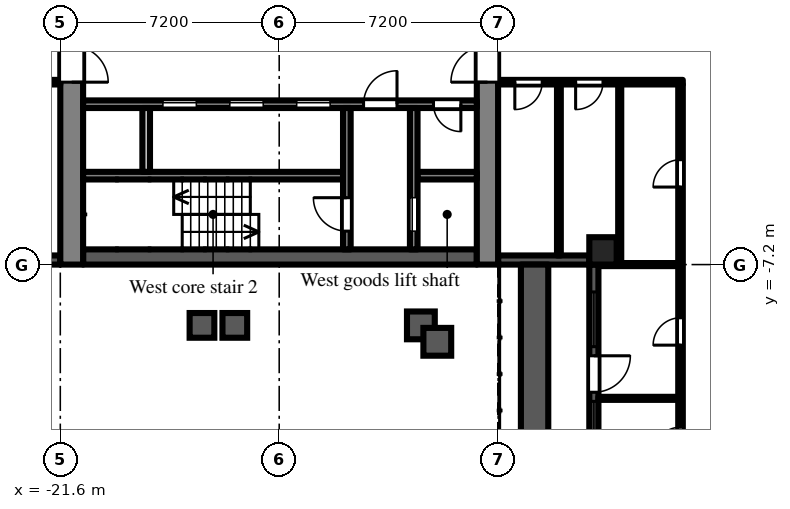
"""IFC4 building model, lengths in metres.
Left out: names, types, materials, properties, quantities, classifications, styles, units other than length and angle.
Written with IfcOpenShell. Run it as: python <this file> out.ifc"""

import sys

from ifc_helpers import new_model, si_unit, direction, frame, frame_2d, origin, origin_2d, place, context, subcontext, project, spatial, rectangle, extrude, element, fill, save


model = new_model("IFC4")
c1 = context("Model", 3, precision=1e-05, world=origin(), true_north=direction((0.0, 1.0)))
c2 = subcontext(c1, "Body", "Model", "MODEL_VIEW")
j1 = project(units=[si_unit("LENGTHUNIT", "METRE"), si_unit("PLANEANGLEUNIT", "RADIAN")], contexts=[c1])
p1 = place(None, origin())
s1 = spatial("IfcSite", under=j1, at=p1, CompositionType="ELEMENT")
p2 = place(p1, origin())
s2 = spatial("IfcBuilding", under=s1, at=p2, CompositionType="ELEMENT")
p3 = place(p2, frame((0.0, 0.0, 53.7)))
s3 = spatial("IfcBuildingStorey", under=s2, at=p3, CompositionType="ELEMENT", Elevation=53.7)
p4 = place(p3, frame((-3.75, -6.75, 0.0), z_axis=(0.0, 0.0, 1.0), x_axis=(1.0, 0.0, 0.0)))
e1 = element("IfcColumn", 1, at=p4, inside=s3, PredefinedType="COLUMN", context=c2, shape_type="SweptSolid", body=[
    extrude(rectangle(XDim=0.9, YDim=0.9, at=origin_2d()), origin(), (0.0, 0.0, 1.0), 3.0),
])
p5 = place(p3, frame((-24.3, -7.05, 0.0), z_axis=(0.0, 0.0, 1.0), x_axis=(1.0, 0.0, 0.0)))
e2 = element("IfcWall", 2, at=p5, inside=s3, PredefinedType="SOLIDWALL", context=c2, shape_type="SweptSolid", body=[
    extrude(rectangle(XDim=2.7, YDim=0.3, at=frame_2d((1.35, 0.0))), origin(), (0.0, 0.0, 1.0), 2.1),
])
p6 = place(p3, frame((-7.2, -7.05, 0.0), z_axis=(0.0, 0.0, 1.0), x_axis=(1.0, 0.0, 0.0)))
e3 = element("IfcWall", 3, at=p6, inside=s3, PredefinedType="SOLIDWALL", context=c2, shape_type="SweptSolid", body=[
    extrude(rectangle(XDim=3.0, YDim=0.3, at=frame_2d((1.5, 0.0))), origin(), (0.0, 0.0, 1.0), 2.1),
])
p7 = place(p3, frame((-4.05, -7.2, 0.0), z_axis=(0.0, 0.0, 1.0), x_axis=(0.0, -1.0, 0.0)))
e4 = element("IfcWall", 4, at=p7, inside=s3, PredefinedType="SOLIDWALL", context=c2, shape_type="SweptSolid", body=[
    extrude(rectangle(XDim=7.2, YDim=0.3, at=frame_2d((3.6, 0.0))), origin(), (0.0, 0.0, 1.0), 2.1),
])
p8 = place(p7, frame((3.0, 0.0, 0.0)))
e5 = element("IfcOpeningElement", 5, at=p8, cuts=e4, PredefinedType="OPENING", context=c2, shape_type="SweptSolid", body=[
    extrude(rectangle(XDim=1.2, YDim=2.05, at=frame_2d((0.6, 1.025))), frame((0.0, 0.16, 0.0), z_axis=(0.0, -1.0, 0.0), x_axis=(1.0, 0.0, 0.0)), (0.0, 0.0, 1.0), 0.32),
])
p9 = place(p7, frame((0.9, 0.0, 0.2)))
e6 = element("IfcOpeningElement", 6, at=p9, cuts=e4, PredefinedType="OPENING", context=c2, shape_type="SweptSolid", body=[
    extrude(rectangle(XDim=1.8, YDim=1.85, at=frame_2d((0.9, 0.925))), frame((0.0, 0.16, 0.0), z_axis=(0.0, -1.0, 0.0), x_axis=(1.0, 0.0, 0.0)), (0.0, 0.0, 1.0), 0.32),
])
p10 = place(p7, frame((4.5, 0.0, 0.2)))
e7 = element("IfcOpeningElement", 7, at=p10, cuts=e4, PredefinedType="OPENING", context=c2, shape_type="SweptSolid", body=[
    extrude(rectangle(XDim=1.8, YDim=1.85, at=frame_2d((0.9, 0.925))), frame((0.0, 0.16, 0.0), z_axis=(0.0, -1.0, 0.0), x_axis=(1.0, 0.0, 0.0)), (0.0, 0.0, 1.0), 0.32),
])
p11 = place(p3, frame((-6.0, -14.4, 0.0), z_axis=(0.0, 0.0, 1.0), x_axis=(0.0, 1.0, 0.0)))
e8 = element("IfcWall", 8, at=p11, inside=s3, PredefinedType="PARAPET", context=c2, shape_type="SweptSolid", body=[
    extrude(rectangle(XDim=7.2, YDim=0.9, at=frame_2d((3.6, 0.0))), origin(), (0.0, 0.0, 1.0), 0.8),
])
p12 = place(p3, frame((-7.55, -7.2, 0.0), z_axis=(0.0, 0.0, 1.0), x_axis=(0.0, 1.0, 0.0)))
e9 = element("IfcWall", 9, at=p12, inside=s3, PredefinedType="SHEAR", context=c2, shape_type="SweptSolid", body=[
    extrude(rectangle(XDim=14.4, YDim=0.7, at=frame_2d((7.2, 0.0))), origin(), (0.0, 0.0, 1.0), 2.575),
])
p13 = place(p12, frame((6.0, 0.0, 0.0)))
e10 = element("IfcOpeningElement", 10, at=p13, cuts=e9, PredefinedType="OPENING", context=c2, shape_type="SweptSolid", body=[
    extrude(rectangle(XDim=2.4, YDim=2.2, at=frame_2d((1.2, 1.1))), frame((0.0, 0.36, 0.0), z_axis=(0.0, -1.0, 0.0), x_axis=(1.0, 0.0, 0.0)), (0.0, 0.0, 1.0), 0.72),
])
p14 = place(p3, frame((-21.225, -7.2, 0.0), z_axis=(0.0, 0.0, 1.0), x_axis=(0.0, 1.0, 0.0)))
e11 = element("IfcWall", 11, at=p14, inside=s3, PredefinedType="SHEAR", context=c2, shape_type="SweptSolid", body=[
    extrude(rectangle(XDim=14.4, YDim=0.75, at=frame_2d((7.2, 0.0))), origin(), (0.0, 0.0, 1.0), 2.575),
])
p15 = place(p14, frame((6.0, 0.0, 0.0)))
e12 = element("IfcOpeningElement", 12, at=p15, cuts=e11, PredefinedType="OPENING", context=c2, shape_type="SweptSolid", body=[
    extrude(rectangle(XDim=2.4, YDim=2.2, at=frame_2d((1.2, 1.1))), frame((0.0, 0.385, 0.0), z_axis=(0.0, -1.0, 0.0), x_axis=(1.0, 0.0, 0.0)), (0.0, 0.0, 1.0), 0.77),
])
p16 = place(p3, frame((-7.9, -6.95, 0.0), z_axis=(0.0, 0.0, 1.0), x_axis=(-1.0, 0.0, 0.0)))
e13 = element("IfcWall", 13, at=p16, inside=s3, PredefinedType="SHEAR", context=c2, shape_type="SweptSolid", body=[
    extrude(rectangle(XDim=12.95, YDim=0.5, at=frame_2d((6.475, 0.0))), origin(), (0.0, 0.0, 1.0), 2.575),
])
p17 = place(p3, frame((-7.9, -1.925, 0.0), z_axis=(0.0, 0.0, 1.0), x_axis=(-1.0, 0.0, 0.0)))
e14 = element("IfcWall", 14, at=p17, inside=s3, PredefinedType="SHEAR", context=c2, shape_type="SweptSolid", body=[
    extrude(rectangle(XDim=12.95, YDim=0.25, at=frame_2d((6.475, 0.0))), origin(), (0.0, 0.0, 1.0), 2.575),
])
p18 = place(p17, frame((4.825, 0.0, 0.0)))
e15 = element("IfcOpeningElement", 15, at=p18, cuts=e14, PredefinedType="OPENING", context=c2, shape_type="SweptSolid", body=[
    extrude(rectangle(XDim=1.1, YDim=2.1, at=frame_2d((0.55, 1.05))), frame((0.0, 0.135, 0.0), z_axis=(0.0, -1.0, 0.0), x_axis=(1.0, 0.0, 0.0)), (0.0, 0.0, 1.0), 0.27),
])
p19 = place(p17, frame((7.025, 0.0, 0.0)))
e16 = element("IfcOpeningElement", 16, at=p19, cuts=e14, PredefinedType="OPENING", context=c2, shape_type="SweptSolid", body=[
    extrude(rectangle(XDim=1.1, YDim=2.1, at=frame_2d((0.55, 1.05))), frame((0.0, 0.135, 0.0), z_axis=(0.0, -1.0, 0.0), x_axis=(1.0, 0.0, 0.0)), (0.0, 0.0, 1.0), 0.27),
])
p20 = place(p17, frame((9.225, 0.0, 0.0)))
e17 = element("IfcOpeningElement", 17, at=p20, cuts=e14, PredefinedType="OPENING", context=c2, shape_type="SweptSolid", body=[
    extrude(rectangle(XDim=1.1, YDim=2.1, at=frame_2d((0.55, 1.05))), frame((0.0, 0.135, 0.0), z_axis=(0.0, -1.0, 0.0), x_axis=(1.0, 0.0, 0.0)), (0.0, 0.0, 1.0), 0.27),
])
p21 = place(p17, frame((0.525, 0.0, 0.0)))
e18 = element("IfcOpeningElement", 18, at=p21, cuts=e14, PredefinedType="OPENING", context=c2, shape_type="SweptSolid", body=[
    extrude(rectangle(XDim=0.9, YDim=2.1, at=frame_2d((0.45, 1.05))), frame((0.0, 0.135, 0.0), z_axis=(0.0, -1.0, 0.0), x_axis=(1.0, 0.0, 0.0)), (0.0, 0.0, 1.0), 0.27),
])
p22 = place(p17, frame((2.625, 0.0, 0.0)))
e19 = element("IfcOpeningElement", 19, at=p22, cuts=e14, PredefinedType="OPENING", context=c2, shape_type="SweptSolid", body=[
    extrude(rectangle(XDim=1.1, YDim=2.1, at=frame_2d((0.55, 1.05))), frame((0.0, 0.135, 0.0), z_axis=(0.0, -1.0, 0.0), x_axis=(1.0, 0.0, 0.0)), (0.0, 0.0, 1.0), 0.27),
])
p23 = place(p3, frame((-7.9, -4.275, 0.0), z_axis=(0.0, 0.0, 1.0), x_axis=(-1.0, 0.0, 0.0)))
e20 = element("IfcWall", 20, at=p23, inside=s3, PredefinedType="SHEAR", context=c2, shape_type="SweptSolid", body=[
    extrude(rectangle(XDim=1.95, YDim=0.25, at=frame_2d((0.975, 0.0))), origin(), (0.0, 0.0, 1.0), 2.575),
])
p24 = place(p3, frame((-12.3, -4.275, 0.0), z_axis=(0.0, 0.0, 1.0), x_axis=(-1.0, 0.0, 0.0)))
e21 = element("IfcWall", 21, at=p24, inside=s3, PredefinedType="SHEAR", context=c2, shape_type="SweptSolid", body=[
    extrude(rectangle(XDim=8.55, YDim=0.25, at=frame_2d((4.275, 0.0))), origin(), (0.0, 0.0, 1.0), 2.575),
])
p25 = place(p3, frame((-9.975, -2.05, 0.0), z_axis=(0.0, 0.0, 1.0), x_axis=(0.0, -1.0, 0.0)))
e22 = element("IfcWall", 22, at=p25, inside=s3, PredefinedType="SHEAR", context=c2, shape_type="SweptSolid", body=[
    extrude(rectangle(XDim=4.65, YDim=0.25, at=frame_2d((2.325, 0.0))), origin(), (0.0, 0.0, 1.0), 2.575),
])
p26 = place(p25, frame((2.95, 0.0, 0.0)))
e23 = element("IfcOpeningElement", 23, at=p26, cuts=e22, PredefinedType="OPENING", context=c2, shape_type="SweptSolid", body=[
    extrude(rectangle(XDim=1.1, YDim=2.1, at=frame_2d((0.55, 1.05))), frame((0.0, 0.135, 0.0), z_axis=(0.0, -1.0, 0.0), x_axis=(1.0, 0.0, 0.0)), (0.0, 0.0, 1.0), 0.27),
])
p27 = place(p3, frame((-12.175, -2.05, 0.0), z_axis=(0.0, 0.0, 1.0), x_axis=(0.0, -1.0, 0.0)))
e24 = element("IfcWall", 24, at=p27, inside=s3, PredefinedType="SHEAR", context=c2, shape_type="SweptSolid", body=[
    extrude(rectangle(XDim=4.65, YDim=0.25, at=frame_2d((2.325, 0.0))), origin(), (0.0, 0.0, 1.0), 2.575),
])
p28 = place(p27, frame((2.95, 0.0, 0.0)))
e25 = element("IfcOpeningElement", 25, at=p28, cuts=e24, PredefinedType="OPENING", context=c2, shape_type="SweptSolid", body=[
    extrude(rectangle(XDim=1.1, YDim=2.1, at=frame_2d((0.55, 1.05))), frame((0.0, 0.135, 0.0), z_axis=(0.0, -1.0, 0.0), x_axis=(1.0, 0.0, 0.0)), (0.0, 0.0, 1.0), 0.27),
])
p29 = place(p3, frame((-18.775, -2.05, 0.0), z_axis=(0.0, 0.0, 1.0), x_axis=(0.0, -1.0, 0.0)))
e26 = element("IfcWall", 26, at=p29, inside=s3, PredefinedType="PARTITIONING", context=c2, shape_type="SweptSolid", body=[
    extrude(rectangle(XDim=2.1, YDim=0.25, at=frame_2d((1.05, 0.0))), origin(), (0.0, 0.0, 1.0), 2.575),
])
p30 = place(p3, frame((-36.5, -1.2, 0.0), z_axis=(0.0, 0.0, 1.0), x_axis=(1.0, 0.0, 0.0)))
e27 = element("IfcWall", 27, at=p30, inside=s3, PredefinedType="PARTITIONING", context=c2, shape_type="SweptSolid", body=[
    extrude(rectangle(XDim=14.9, YDim=0.15, at=frame_2d((7.45, 0.0))), origin(), (0.0, 0.0, 1.0), 2.575),
])
p31 = place(p30, frame((10.4, 0.0, 0.0)))
e28 = element("IfcOpeningElement", 28, at=p31, cuts=e27, PredefinedType="OPENING", context=c2, shape_type="SweptSolid", body=[
    extrude(rectangle(XDim=1.8, YDim=2.1, at=frame_2d((0.9, 1.05))), frame((0.0, 0.085, 0.0), z_axis=(0.0, -1.0, 0.0), x_axis=(1.0, 0.0, 0.0)), (0.0, 0.0, 1.0), 0.17),
])
p32 = place(p30, frame((6.35, 0.0, 0.0)))
e29 = element("IfcOpeningElement", 29, at=p32, cuts=e27, PredefinedType="OPENING", context=c2, shape_type="SweptSolid", body=[
    extrude(rectangle(XDim=0.9, YDim=2.1, at=frame_2d((0.45, 1.05))), frame((0.0, 0.085, 0.0), z_axis=(0.0, -1.0, 0.0), x_axis=(1.0, 0.0, 0.0)), (0.0, 0.0, 1.0), 0.17),
])
p33 = place(p30, frame((4.55, 0.0, 0.0)))
e30 = element("IfcOpeningElement", 30, at=p33, cuts=e27, PredefinedType="OPENING", context=c2, shape_type="SweptSolid", body=[
    extrude(rectangle(XDim=0.9, YDim=2.1, at=frame_2d((0.45, 1.05))), frame((0.0, 0.085, 0.0), z_axis=(0.0, -1.0, 0.0), x_axis=(1.0, 0.0, 0.0)), (0.0, 0.0, 1.0), 0.17),
])
p34 = place(p30, frame((1.15, 0.0, 0.0)))
e31 = element("IfcOpeningElement", 31, at=p34, cuts=e27, PredefinedType="OPENING", context=c2, shape_type="SweptSolid", body=[
    extrude(rectangle(XDim=1.8, YDim=2.1, at=frame_2d((0.9, 1.05))), frame((0.0, 0.085, 0.0), z_axis=(0.0, -1.0, 0.0), x_axis=(1.0, 0.0, 0.0)), (0.0, 0.0, 1.0), 0.17),
])
p35 = place(p3, frame((-7.2, -1.2, 0.0), z_axis=(0.0, 0.0, 1.0), x_axis=(1.0, 0.0, 0.0)))
e32 = element("IfcWall", 32, at=p35, inside=s3, PredefinedType="PARTITIONING", context=c2, shape_type="SweptSolid", body=[
    extrude(rectangle(XDim=6.075, YDim=0.15, at=frame_2d((3.038, 0.0))), origin(), (0.0, 0.0, 1.0), 2.575),
])
p36 = place(p35, frame((2.55, 0.0, 0.0)))
e33 = element("IfcOpeningElement", 33, at=p36, cuts=e32, PredefinedType="OPENING", context=c2, shape_type="SweptSolid", body=[
    extrude(rectangle(XDim=0.9, YDim=2.1, at=frame_2d((0.45, 1.05))), frame((0.0, 0.085, 0.0), z_axis=(0.0, -1.0, 0.0), x_axis=(1.0, 0.0, 0.0)), (0.0, 0.0, 1.0), 0.17),
])
p37 = place(p35, frame((0.55, 0.0, 0.0)))
e34 = element("IfcOpeningElement", 34, at=p37, cuts=e32, PredefinedType="OPENING", context=c2, shape_type="SweptSolid", body=[
    extrude(rectangle(XDim=0.9, YDim=2.1, at=frame_2d((0.45, 1.05))), frame((0.0, 0.085, 0.0), z_axis=(0.0, -1.0, 0.0), x_axis=(1.0, 0.0, 0.0)), (0.0, 0.0, 1.0), 0.17),
])
p38 = place(p3, frame((-5.2, -6.9, 0.0), z_axis=(0.0, 0.0, 1.0), x_axis=(0.0, 1.0, 0.0)))
e35 = element("IfcWall", 35, at=p38, inside=s3, PredefinedType="PARTITIONING", context=c2, shape_type="SweptSolid", body=[
    extrude(rectangle(XDim=5.625, YDim=0.125, at=frame_2d((2.812, 0.0))), origin(), (0.0, 0.0, 1.0), 2.575),
])
for number, where, z_axis, x_axis in (
    (36, (-3.9, -11.6, 0.0), (0.0, 0.0, 1.0), (1.0, 0.0, 0.0)),
    (37, (-3.9, -7.2, 0.0), (0.0, 0.0, 1.0), (1.0, 0.0, 0.0)),
):
    element("IfcWall", number, at=place(p3, frame(where, z_axis=z_axis, x_axis=x_axis)), inside=s3, PredefinedType="PARTITIONING", context=c2, shape_type="SweptSolid", body=[
        extrude(rectangle(XDim=2.625, YDim=0.1, at=frame_2d((1.312, 0.0))), origin(), (0.0, 0.0, 1.0), 2.575),
    ])
p39 = place(p3, frame((-3.2, -7.15, 0.0), z_axis=(0.0, 0.0, 1.0), x_axis=(0.0, 1.0, 0.0)))
e38 = element("IfcWall", 38, at=p39, inside=s3, PredefinedType="PARTITIONING", context=c2, shape_type="SweptSolid", body=[
    extrude(rectangle(XDim=5.875, YDim=0.1, at=frame_2d((2.938, 0.0))), origin(), (0.0, 0.0, 1.0), 2.575),
])
p40 = place(p3, frame((-1.2, -36.5, 0.0), z_axis=(0.0, 0.0, 1.0), x_axis=(0.0, 1.0, 0.0)))
e39 = element("IfcWall", 39, at=p40, inside=s3, PredefinedType="PARTITIONING", context=c2, shape_type="SweptSolid", body=[
    extrude(rectangle(XDim=35.225, YDim=0.15, at=frame_2d((17.613, 0.0))), origin(), (0.0, 0.0, 1.0), 2.575),
])
p41 = place(p40, frame((31.85, 0.0, 0.0)))
e40 = element("IfcOpeningElement", 40, at=p41, cuts=e39, PredefinedType="OPENING", context=c2, shape_type="SweptSolid", body=[
    extrude(rectangle(XDim=0.9, YDim=2.1, at=frame_2d((0.45, 1.05))), frame((0.0, 0.085, 0.0), z_axis=(0.0, -1.0, 0.0), x_axis=(1.0, 0.0, 0.0)), (0.0, 0.0, 1.0), 0.17),
])
p42 = place(p40, frame((23.05, 0.0, 0.0)))
e41 = element("IfcOpeningElement", 41, at=p42, cuts=e39, PredefinedType="OPENING", context=c2, shape_type="SweptSolid", body=[
    extrude(rectangle(XDim=0.9, YDim=2.1, at=frame_2d((0.45, 1.05))), frame((0.0, 0.085, 0.0), z_axis=(0.0, -1.0, 0.0), x_axis=(1.0, 0.0, 0.0)), (0.0, 0.0, 1.0), 0.17),
])
p43 = place(p40, frame((26.65, 0.0, 0.0)))
e42 = element("IfcOpeningElement", 42, at=p43, cuts=e39, PredefinedType="OPENING", context=c2, shape_type="SweptSolid", body=[
    extrude(rectangle(XDim=0.9, YDim=2.1, at=frame_2d((0.45, 1.05))), frame((0.0, 0.085, 0.0), z_axis=(0.0, -1.0, 0.0), x_axis=(1.0, 0.0, 0.0)), (0.0, 0.0, 1.0), 0.17),
])
p44 = place(p40, frame((20.9, 0.0, 0.0)))
e43 = element("IfcOpeningElement", 43, at=p44, cuts=e39, PredefinedType="OPENING", context=c2, shape_type="SweptSolid", body=[
    extrude(rectangle(XDim=1.0, YDim=2.1, at=frame_2d((0.5, 1.05))), frame((0.0, 0.085, 0.0), z_axis=(0.0, -1.0, 0.0), x_axis=(1.0, 0.0, 0.0)), (0.0, 0.0, 1.0), 0.17),
])
p45 = place(p40, frame((1.55, 0.0, 0.0)))
e44 = element("IfcOpeningElement", 44, at=p45, cuts=e39, PredefinedType="OPENING", context=c2, shape_type="SweptSolid", body=[
    extrude(rectangle(XDim=1.0, YDim=2.1, at=frame_2d((0.5, 1.05))), frame((0.0, 0.085, 0.0), z_axis=(0.0, -1.0, 0.0), x_axis=(1.0, 0.0, 0.0)), (0.0, 0.0, 1.0), 0.17),
])
p46 = place(p8, origin())
e45 = element("IfcDoor", 45, at=p46, inside=s3, OperationType="SINGLE_SWING_LEFT", PredefinedType="DOOR", context=c2, shape_type="SweptSolid", body=[
    extrude(rectangle(XDim=1.2, YDim=2.05, at=frame_2d((0.6, 1.025))), frame((0.0, 0.025, 0.0), z_axis=(0.0, -1.0, 0.0), x_axis=(1.0, 0.0, 0.0)), (0.0, 0.0, 1.0), 0.05),
])
fill(e5, e45)
p47 = place(p9, origin())
e46 = element("IfcWindow", 46, at=p47, inside=s3, PartitioningType="SINGLE_PANEL", PredefinedType="WINDOW", context=c2, shape_type="SweptSolid", body=[
    extrude(rectangle(XDim=1.8, YDim=1.85, at=frame_2d((0.9, 0.925))), frame((0.0, 0.03, 0.0), z_axis=(0.0, -1.0, 0.0), x_axis=(1.0, 0.0, 0.0)), (0.0, 0.0, 1.0), 0.06),
])
fill(e6, e46)
p48 = place(p10, origin())
e47 = element("IfcWindow", 47, at=p48, inside=s3, PartitioningType="SINGLE_PANEL", PredefinedType="WINDOW", context=c2, shape_type="SweptSolid", body=[
    extrude(rectangle(XDim=1.8, YDim=1.85, at=frame_2d((0.9, 0.925))), frame((0.0, 0.03, 0.0), z_axis=(0.0, -1.0, 0.0), x_axis=(1.0, 0.0, 0.0)), (0.0, 0.0, 1.0), 0.06),
])
fill(e7, e47)
p49 = place(p18, origin())
e48 = element("IfcDoor", 48, at=p49, inside=s3, OperationType="SLIDING_TO_LEFT", PredefinedType="DOOR", context=c2, shape_type="SweptSolid", body=[
    extrude(rectangle(XDim=1.1, YDim=2.1, at=frame_2d((0.55, 1.05))), frame((0.0, 0.025, 0.0), z_axis=(0.0, -1.0, 0.0), x_axis=(1.0, 0.0, 0.0)), (0.0, 0.0, 1.0), 0.05),
])
fill(e15, e48)
p50 = place(p19, origin())
e49 = element("IfcDoor", 49, at=p50, inside=s3, OperationType="SLIDING_TO_LEFT", PredefinedType="DOOR", context=c2, shape_type="SweptSolid", body=[
    extrude(rectangle(XDim=1.1, YDim=2.1, at=frame_2d((0.55, 1.05))), frame((0.0, 0.025, 0.0), z_axis=(0.0, -1.0, 0.0), x_axis=(1.0, 0.0, 0.0)), (0.0, 0.0, 1.0), 0.05),
])
fill(e16, e49)
p51 = place(p20, origin())
e50 = element("IfcDoor", 50, at=p51, inside=s3, OperationType="SLIDING_TO_LEFT", PredefinedType="DOOR", context=c2, shape_type="SweptSolid", body=[
    extrude(rectangle(XDim=1.1, YDim=2.1, at=frame_2d((0.55, 1.05))), frame((0.0, 0.025, 0.0), z_axis=(0.0, -1.0, 0.0), x_axis=(1.0, 0.0, 0.0)), (0.0, 0.0, 1.0), 0.05),
])
fill(e17, e50)
p52 = place(p26, origin())
e51 = element("IfcDoor", 51, at=p52, inside=s3, OperationType="SLIDING_TO_LEFT", PredefinedType="DOOR", context=c2, shape_type="SweptSolid", body=[
    extrude(rectangle(XDim=1.1, YDim=2.1, at=frame_2d((0.55, 1.05))), frame((0.0, 0.025, 0.0), z_axis=(0.0, -1.0, 0.0), x_axis=(1.0, 0.0, 0.0)), (0.0, 0.0, 1.0), 0.05),
])
fill(e23, e51)
p53 = place(p28, frame((1.1, 0.0, 0.0), z_axis=(0.0, 0.0, 1.0), x_axis=(-1.0, 0.0, 0.0)))
e52 = element("IfcDoor", 52, at=p53, inside=s3, OperationType="SINGLE_SWING_RIGHT", PredefinedType="DOOR", context=c2, shape_type="SweptSolid", body=[
    extrude(rectangle(XDim=1.1, YDim=2.1, at=frame_2d((0.55, 1.05))), frame((0.0, 0.025, 0.0), z_axis=(0.0, -1.0, 0.0), x_axis=(1.0, 0.0, 0.0)), (0.0, 0.0, 1.0), 0.05),
])
fill(e25, e52)
p54 = place(p21, origin())
e53 = element("IfcDoor", 53, at=p54, inside=s3, OperationType="SINGLE_SWING_LEFT", PredefinedType="DOOR", context=c2, shape_type="SweptSolid", body=[
    extrude(rectangle(XDim=0.9, YDim=2.1, at=frame_2d((0.45, 1.05))), frame((0.0, 0.025, 0.0), z_axis=(0.0, -1.0, 0.0), x_axis=(1.0, 0.0, 0.0)), (0.0, 0.0, 1.0), 0.05),
])
fill(e18, e53)
p55 = place(p22, frame((1.1, 0.0, 0.0), z_axis=(0.0, 0.0, 1.0), x_axis=(-1.0, 0.0, 0.0)))
e54 = element("IfcDoor", 54, at=p55, inside=s3, OperationType="SINGLE_SWING_RIGHT", PredefinedType="DOOR", context=c2, shape_type="SweptSolid", body=[
    extrude(rectangle(XDim=1.1, YDim=2.1, at=frame_2d((0.55, 1.05))), frame((0.0, 0.025, 0.0), z_axis=(0.0, -1.0, 0.0), x_axis=(1.0, 0.0, 0.0)), (0.0, 0.0, 1.0), 0.05),
])
fill(e19, e54)
p56 = place(p13, origin())
e55 = element("IfcDoor", 55, at=p56, inside=s3, OperationType="DOUBLE_DOOR_DOUBLE_SWING", PredefinedType="DOOR", context=c2, shape_type="SweptSolid", body=[
    extrude(rectangle(XDim=2.4, YDim=2.2, at=frame_2d((1.2, 1.1))), frame((0.0, 0.025, 0.0), z_axis=(0.0, -1.0, 0.0), x_axis=(1.0, 0.0, 0.0)), (0.0, 0.0, 1.0), 0.05),
])
fill(e10, e55)
p57 = place(p15, frame((2.4, 0.0, 0.0), z_axis=(0.0, 0.0, 1.0), x_axis=(-1.0, 0.0, 0.0)))
e56 = element("IfcDoor", 56, at=p57, inside=s3, OperationType="DOUBLE_DOOR_DOUBLE_SWING", PredefinedType="DOOR", context=c2, shape_type="SweptSolid", body=[
    extrude(rectangle(XDim=2.4, YDim=2.2, at=frame_2d((1.2, 1.1))), frame((0.0, 0.025, 0.0), z_axis=(0.0, -1.0, 0.0), x_axis=(1.0, 0.0, 0.0)), (0.0, 0.0, 1.0), 0.05),
])
fill(e12, e56)
p58 = place(p41, origin())
e57 = element("IfcDoor", 57, at=p58, inside=s3, OperationType="SINGLE_SWING_LEFT", PredefinedType="DOOR", context=c2, shape_type="SweptSolid", body=[
    extrude(rectangle(XDim=0.9, YDim=2.1, at=frame_2d((0.45, 1.05))), frame((0.0, 0.025, 0.0), z_axis=(0.0, -1.0, 0.0), x_axis=(1.0, 0.0, 0.0)), (0.0, 0.0, 1.0), 0.05),
])
fill(e40, e57)
p59 = place(p36, frame((0.9, 0.0, 0.0), z_axis=(0.0, 0.0, 1.0), x_axis=(-1.0, 0.0, 0.0)))
e58 = element("IfcDoor", 58, at=p59, inside=s3, OperationType="SINGLE_SWING_RIGHT", PredefinedType="DOOR", context=c2, shape_type="SweptSolid", body=[
    extrude(rectangle(XDim=0.9, YDim=2.1, at=frame_2d((0.45, 1.05))), frame((0.0, 0.025, 0.0), z_axis=(0.0, -1.0, 0.0), x_axis=(1.0, 0.0, 0.0)), (0.0, 0.0, 1.0), 0.05),
])
fill(e33, e58)
p60 = place(p37, frame((0.9, 0.0, 0.0), z_axis=(0.0, 0.0, 1.0), x_axis=(-1.0, 0.0, 0.0)))
e59 = element("IfcDoor", 59, at=p60, inside=s3, OperationType="SINGLE_SWING_RIGHT", PredefinedType="DOOR", context=c2, shape_type="SweptSolid", body=[
    extrude(rectangle(XDim=0.9, YDim=2.1, at=frame_2d((0.45, 1.05))), frame((0.0, 0.025, 0.0), z_axis=(0.0, -1.0, 0.0), x_axis=(1.0, 0.0, 0.0)), (0.0, 0.0, 1.0), 0.05),
])
fill(e34, e59)
p61 = place(p42, origin())
e60 = element("IfcDoor", 60, at=p61, inside=s3, OperationType="SINGLE_SWING_LEFT", PredefinedType="DOOR", context=c2, shape_type="SweptSolid", body=[
    extrude(rectangle(XDim=0.9, YDim=2.1, at=frame_2d((0.45, 1.05))), frame((0.0, 0.025, 0.0), z_axis=(0.0, -1.0, 0.0), x_axis=(1.0, 0.0, 0.0)), (0.0, 0.0, 1.0), 0.05),
])
fill(e41, e60)
p62 = place(p43, origin())
e61 = element("IfcDoor", 61, at=p62, inside=s3, OperationType="SINGLE_SWING_LEFT", PredefinedType="DOOR", context=c2, shape_type="SweptSolid", body=[
    extrude(rectangle(XDim=0.9, YDim=2.1, at=frame_2d((0.45, 1.05))), frame((0.0, 0.025, 0.0), z_axis=(0.0, -1.0, 0.0), x_axis=(1.0, 0.0, 0.0)), (0.0, 0.0, 1.0), 0.05),
])
fill(e42, e61)
save(model, sys.argv[1])
